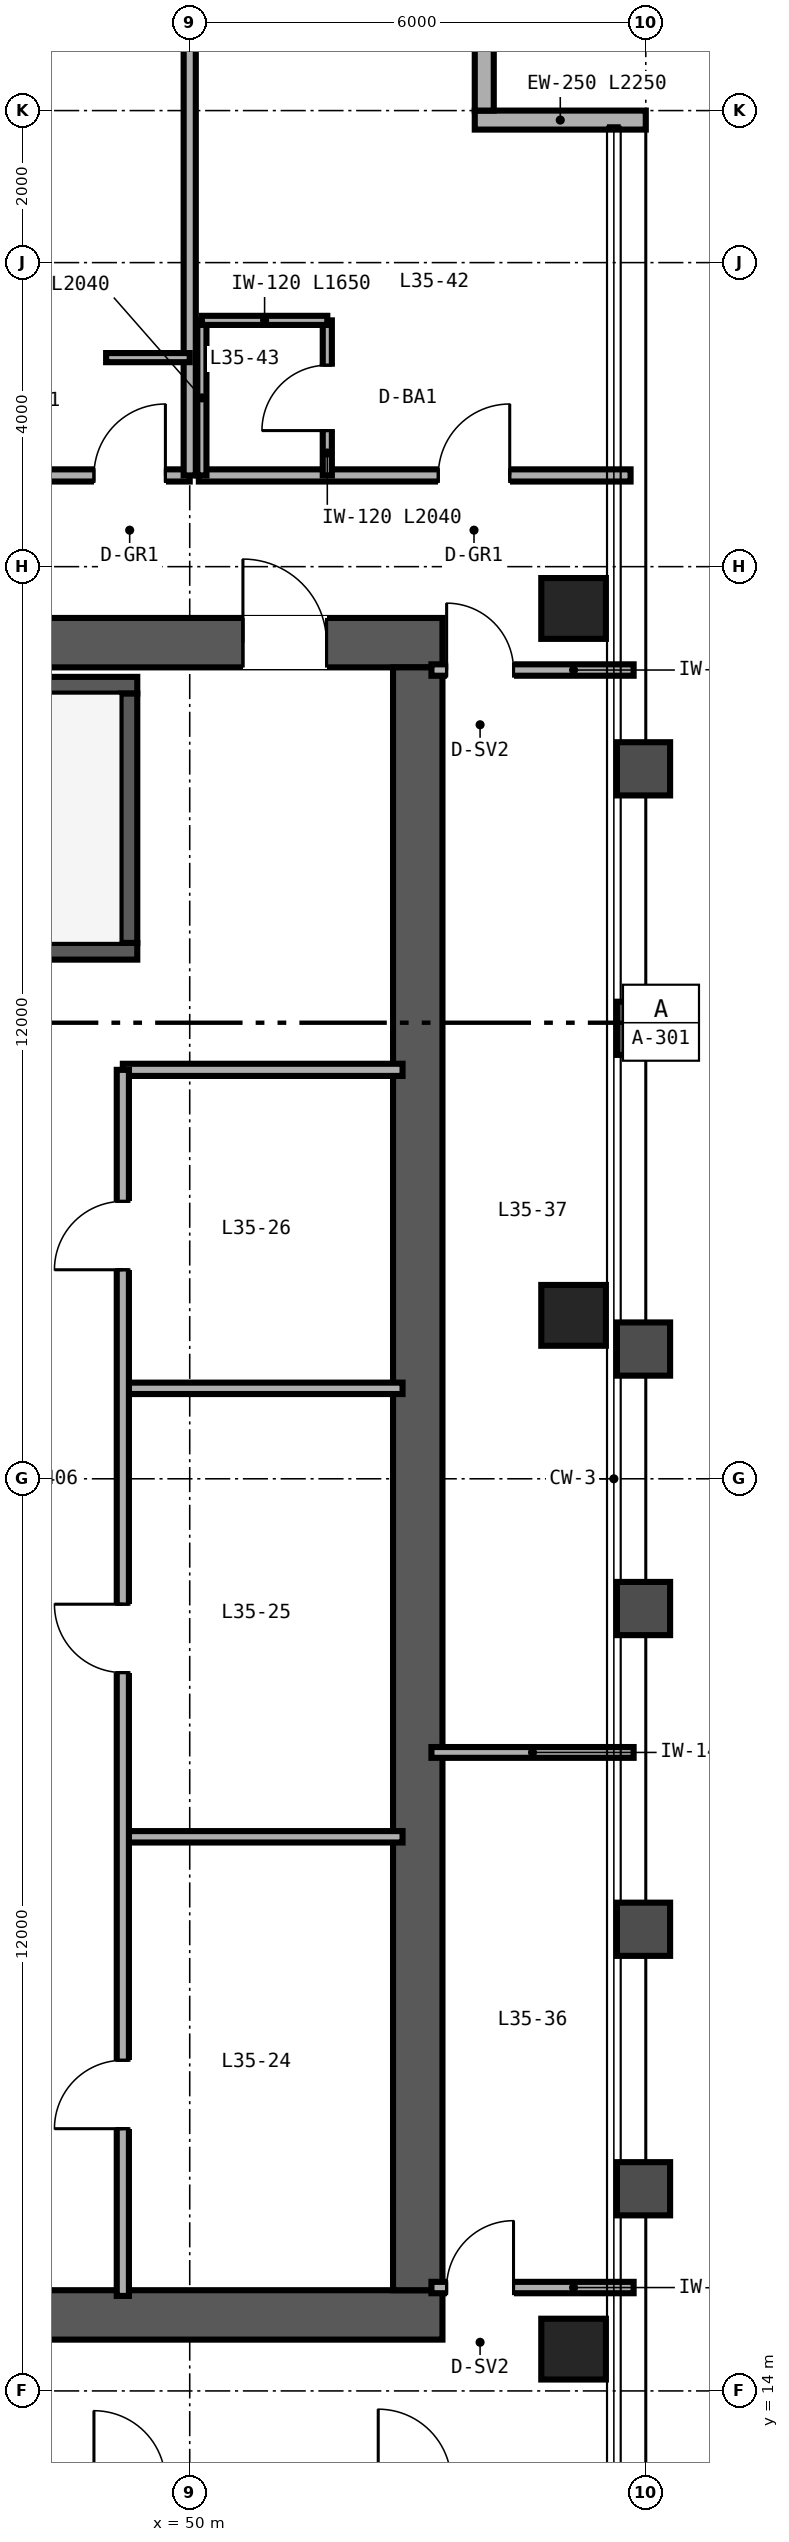
"""IFC4 building model, lengths in metres.
Left out: names, types, materials, properties, quantities, classifications, styles, units other than length and angle.
Written with IfcOpenShell. Run it as: python <this file> out.ifc"""

import sys

from ifc_helpers import new_model, si_unit, direction, frame, frame_2d, origin, origin_2d, place, context, subcontext, project, spatial, rectangle, hollow_rectangle, extrude, source, transform, mapped, element, fill, save


model = new_model("IFC4")
c1 = context("Model", 3, precision=1e-05, world=origin(), true_north=direction((0.0, 1.0)))
c2 = subcontext(c1, "Body", "Model", "MODEL_VIEW")
j1 = project(units=[si_unit("LENGTHUNIT", "METRE"), si_unit("PLANEANGLEUNIT", "RADIAN")], contexts=[c1])
p1 = place(None, origin())
s1 = spatial("IfcSite", under=j1, at=p1, CompositionType="ELEMENT")
p2 = place(p1, origin())
s2 = spatial("IfcBuilding", under=s1, at=p2, CompositionType="ELEMENT")
p3 = place(p2, frame((0.0, 0.0, 140.4)))
s3 = spatial("IfcBuildingStorey", under=s2, at=p3, CompositionType="ELEMENT", Elevation=140.4)
p4 = place(p3, frame((40.675, 15.0, 0.0), z_axis=(0.0, 0.0, 1.0), x_axis=(1.0, 0.0, 0.0)))
e1 = element("IfcWall", 1, at=p4, inside=s3, PredefinedType="SHEAR", context=c2, shape_type="SweptSolid", body=[
    extrude(rectangle(XDim=12.65, YDim=0.65, at=frame_2d((6.325, 0.0))), origin(), (0.0, 0.0, 1.0), 3.36),
])
p5 = place(p4, frame((4.425, 0.0, 0.0)))
e2 = element("IfcOpeningElement", 2, at=p5, cuts=e1, PredefinedType="OPENING", context=c2, shape_type="SweptSolid", body=[
    extrude(rectangle(XDim=1.0, YDim=2.15, at=frame_2d((0.5, 1.075))), frame((0.0, 0.335, 0.0), z_axis=(0.0, -1.0, 0.0), x_axis=(1.0, 0.0, 0.0)), (0.0, 0.0, 1.0), 0.67),
])
p6 = place(p3, frame((40.675, 37.0, 0.0), z_axis=(0.0, 0.0, 1.0), x_axis=(1.0, 0.0, 0.0)))
e3 = element("IfcWall", 3, at=p6, inside=s3, PredefinedType="SHEAR", context=c2, shape_type="SweptSolid", body=[
    extrude(rectangle(XDim=12.65, YDim=0.65, at=frame_2d((6.325, 0.0))), origin(), (0.0, 0.0, 1.0), 3.36),
])
p7 = place(p6, frame((10.025, 0.0, 0.0)))
e4 = element("IfcOpeningElement", 4, at=p7, cuts=e3, PredefinedType="OPENING", context=c2, shape_type="SweptSolid", body=[
    extrude(rectangle(XDim=1.1, YDim=2.15, at=frame_2d((0.55, 1.075))), frame((0.0, 0.335, 0.0), z_axis=(0.0, -1.0, 0.0), x_axis=(1.0, 0.0, 0.0)), (0.0, 0.0, 1.0), 0.67),
])
p8 = place(p3, frame((53.0, 15.325, 0.0), z_axis=(0.0, 0.0, 1.0), x_axis=(0.0, 1.0, 0.0)))
e5 = element("IfcWall", 5, at=p8, inside=s3, PredefinedType="SHEAR", context=c2, shape_type="SweptSolid", body=[
    extrude(rectangle(XDim=21.35, YDim=0.65, at=frame_2d((10.675, 0.0))), origin(), (0.0, 0.0, 1.0), 3.36),
])
p9 = place(p3, frame((41.325, 32.94, 0.0), z_axis=(0.0, 0.0, 1.0), x_axis=(1.0, 0.0, 0.0)))
e6 = element("IfcWall", 6, at=p9, inside=s3, PredefinedType="SHEAR", context=c2, shape_type="SweptSolid", body=[
    extrude(rectangle(XDim=7.985, YDim=0.22, at=frame_2d((3.993, 0.0))), origin(), (0.0, 0.0, 1.0), 3.4),
])
p10 = place(p9, frame((0.595, 0.0, 0.0)))
e7 = element("IfcOpeningElement", 7, at=p10, cuts=e6, PredefinedType="OPENING", context=c2, shape_type="SweptSolid", body=[
    extrude(rectangle(XDim=1.05, YDim=2.15, at=frame_2d((0.525, 1.075))), frame((0.0, 0.12, 0.0), z_axis=(0.0, -1.0, 0.0), x_axis=(1.0, 0.0, 0.0)), (0.0, 0.0, 1.0), 0.24),
])
p11 = place(p3, frame((41.325, 36.44, 0.0), z_axis=(0.0, 0.0, 1.0), x_axis=(1.0, 0.0, 0.0)))
e8 = element("IfcWall", 8, at=p11, inside=s3, PredefinedType="SHEAR", context=c2, shape_type="SweptSolid", body=[
    extrude(rectangle(XDim=7.985, YDim=0.22, at=frame_2d((3.993, 0.0))), origin(), (0.0, 0.0, 1.0), 3.4),
])
p12 = place(p3, frame((49.2, 33.05, 0.0), z_axis=(0.0, 0.0, 1.0), x_axis=(0.0, 1.0, 0.0)))
e9 = element("IfcWall", 9, at=p12, inside=s3, PredefinedType="SHEAR", context=c2, shape_type="SweptSolid", body=[
    extrude(rectangle(XDim=3.28, YDim=0.22, at=frame_2d((1.64, 0.0))), origin(), (0.0, 0.0, 1.0), 3.4),
])
m1 = source(origin(), c2, "Body", "SweptSolid", [
    extrude(hollow_rectangle(XDim=0.85, YDim=0.8, WallThickness=0.032, at=origin_2d()), origin(), (0.0, 0.0, 1.0), 3.36),
])
for number, where, z_axis, x_axis in (
    (10, (55.05, 14.55, 0.0), (0.0, 0.0, 1.0), (1.0, 0.0, 0.0)),
    (11, (55.05, 28.15, 0.0), (0.0, 0.0, 1.0), (1.0, 0.0, 0.0)),
    (12, (55.05, 37.45, 0.0), (0.0, 0.0, 1.0), (1.0, 0.0, 0.0)),
):
    element("IfcColumn", number, at=place(p3, frame(where, z_axis=z_axis, x_axis=x_axis)), inside=s3, PredefinedType="COLUMN", context=c2, shape_type="MappedRepresentation", body=[
        mapped(m1, transform((0.0, 0.0, 0.0), scale=1.0)),
    ])
p13 = place(p3, frame((56.0, 43.875, 0.0), z_axis=(0.0, 0.0, 1.0), x_axis=(-1.0, 0.0, 0.0)))
e13 = element("IfcWall", 13, at=p13, inside=s3, PredefinedType="SOLIDWALL", context=c2, shape_type="SweptSolid", body=[
    extrude(rectangle(XDim=2.25, YDim=0.25, at=frame_2d((1.125, 0.0))), origin(), (0.0, 0.0, 1.0), 3.36),
])
p14 = place(p3, frame((53.875, 44.0, 0.0), z_axis=(0.0, 0.0, 1.0), x_axis=(0.0, 1.0, 0.0)))
e14 = element("IfcWall", 14, at=p14, inside=s3, PredefinedType="SOLIDWALL", context=c2, shape_type="SweptSolid", body=[
    extrude(rectangle(XDim=2.0, YDim=0.25, at=frame_2d((1.0, 0.0))), origin(), (0.0, 0.0, 1.0), 3.36),
])
p15 = place(p3, frame((49.12, 31.38, 0.0), z_axis=(0.0, 0.0, 1.0), x_axis=(1.0, 0.0, 0.0)))
e15 = element("IfcWall", 15, at=p15, inside=s3, PredefinedType="PARTITIONING", context=c2, shape_type="SweptSolid", body=[
    extrude(rectangle(XDim=3.68, YDim=0.16, at=frame_2d((1.84, 0.0))), origin(), (0.0, 0.0, 1.0), 2.36),
])
for number, where, z_axis, x_axis in (
    (16, (49.12, 21.29, 0.0), (0.0, 0.0, 1.0), (1.0, 0.0, 0.0)),
    (17, (49.12, 27.19, 0.0), (0.0, 0.0, 1.0), (1.0, 0.0, 0.0)),
):
    element("IfcWall", number, at=place(p3, frame(where, z_axis=z_axis, x_axis=x_axis)), inside=s3, PredefinedType="PARTITIONING", context=c2, shape_type="SweptSolid", body=[
        extrude(rectangle(XDim=3.68, YDim=0.15, at=frame_2d((1.84, 0.0))), origin(), (0.0, 0.0, 1.0), 3.36),
    ])
p16 = place(p3, frame((49.12, 15.25, 0.0), z_axis=(0.0, 0.0, 1.0), x_axis=(0.0, 1.0, 0.0)))
e18 = element("IfcWall", 18, at=p16, inside=s3, PredefinedType="PARTITIONING", context=c2, shape_type="SweptSolid", body=[
    extrude(rectangle(XDim=16.13, YDim=0.16, at=frame_2d((8.065, 0.0))), origin(), (0.0, 0.0, 1.0), 2.36),
])
p17 = place(p16, frame((2.2, 0.0, 0.0)))
e19 = element("IfcOpeningElement", 19, at=p17, cuts=e18, PredefinedType="OPENING", context=c2, shape_type="SweptSolid", body=[
    extrude(rectangle(XDim=0.9, YDim=2.15, at=frame_2d((0.45, 1.075))), frame((0.0, 0.09, 0.0), z_axis=(0.0, -1.0, 0.0), x_axis=(1.0, 0.0, 0.0)), (0.0, 0.0, 1.0), 0.18),
])
p18 = place(p16, frame((8.2, 0.0, 0.0)))
e20 = element("IfcOpeningElement", 20, at=p18, cuts=e18, PredefinedType="OPENING", context=c2, shape_type="SweptSolid", body=[
    extrude(rectangle(XDim=0.9, YDim=2.15, at=frame_2d((0.45, 1.075))), frame((0.0, 0.09, 0.0), z_axis=(0.0, -1.0, 0.0), x_axis=(1.0, 0.0, 0.0)), (0.0, 0.0, 1.0), 0.18),
])
p19 = place(p16, frame((13.5, 0.0, 0.0)))
e21 = element("IfcOpeningElement", 21, at=p19, cuts=e18, PredefinedType="OPENING", context=c2, shape_type="SweptSolid", body=[
    extrude(rectangle(XDim=0.9, YDim=2.15, at=frame_2d((0.45, 1.075))), frame((0.0, 0.09, 0.0), z_axis=(0.0, -1.0, 0.0), x_axis=(1.0, 0.0, 0.0)), (0.0, 0.0, 1.0), 0.18),
])
p20 = place(p3, frame((53.18, 15.36, 0.0), z_axis=(0.0, 0.0, 1.0), x_axis=(1.0, 0.0, 0.0)))
e22 = element("IfcWall", 22, at=p20, inside=s3, PredefinedType="PARTITIONING", context=c2, shape_type="SweptSolid", body=[
    extrude(rectangle(XDim=2.66, YDim=0.15, at=frame_2d((1.33, 0.0))), origin(), (0.0, 0.0, 1.0), 2.581),
])
p21 = place(p20, frame((0.2, 0.0, 0.0)))
e23 = element("IfcOpeningElement", 23, at=p21, cuts=e22, PredefinedType="OPENING", context=c2, shape_type="SweptSolid", body=[
    extrude(rectangle(XDim=0.88, YDim=2.15, at=frame_2d((0.44, 1.075))), frame((0.0, 0.085, 0.0), z_axis=(0.0, -1.0, 0.0), x_axis=(1.0, 0.0, 0.0)), (0.0, 0.0, 1.0), 0.17),
])
p22 = place(p3, frame((53.18, 36.64, 0.0), z_axis=(0.0, 0.0, 1.0), x_axis=(1.0, 0.0, 0.0)))
e24 = element("IfcWall", 24, at=p22, inside=s3, PredefinedType="PARTITIONING", context=c2, shape_type="SweptSolid", body=[
    extrude(rectangle(XDim=2.66, YDim=0.15, at=frame_2d((1.33, 0.0))), origin(), (0.0, 0.0, 1.0), 2.743),
])
p23 = place(p22, frame((0.2, 0.0, 0.0)))
e25 = element("IfcOpeningElement", 25, at=p23, cuts=e24, PredefinedType="OPENING", context=c2, shape_type="SweptSolid", body=[
    extrude(rectangle(XDim=0.88, YDim=2.15, at=frame_2d((0.44, 1.075))), frame((0.0, 0.085, 0.0), z_axis=(0.0, -1.0, 0.0), x_axis=(1.0, 0.0, 0.0)), (0.0, 0.0, 1.0), 0.17),
])
p24 = place(p3, frame((53.18, 22.4, 0.0), z_axis=(0.0, 0.0, 1.0), x_axis=(1.0, 0.0, 0.0)))
e26 = element("IfcWall", 26, at=p24, inside=s3, PredefinedType="PARTITIONING", context=c2, shape_type="SweptSolid", body=[
    extrude(rectangle(XDim=2.66, YDim=0.142, at=frame_2d((1.33, 0.0))), origin(), (0.0, 0.0, 1.0), 2.581),
])
p25 = place(p3, frame((50.12, 39.2, 0.0), z_axis=(0.0, 0.0, 1.0), x_axis=(1.0, 0.0, 0.0)))
e27 = element("IfcWall", 27, at=p25, inside=s3, PredefinedType="PARTITIONING", context=c2, shape_type="SweptSolid", body=[
    extrude(rectangle(XDim=5.68, YDim=0.16, at=frame_2d((2.84, 0.0))), origin(), (0.0, 0.0, 1.0), 3.36),
])
p26 = place(p25, frame((3.15, 0.0, 0.0)))
e28 = element("IfcOpeningElement", 28, at=p26, cuts=e27, PredefinedType="OPENING", context=c2, shape_type="SweptSolid", body=[
    extrude(rectangle(XDim=0.94, YDim=2.15, at=frame_2d((0.47, 1.075))), frame((0.0, 0.09, 0.0), z_axis=(0.0, -1.0, 0.0), x_axis=(1.0, 0.0, 0.0)), (0.0, 0.0, 1.0), 0.18),
])
p27 = place(p3, frame((51.81, 39.2, 0.0), z_axis=(0.0, 0.0, 1.0), x_axis=(0.0, 1.0, 0.0)))
e29 = element("IfcWall", 29, at=p27, inside=s3, PredefinedType="PARTITIONING", context=c2, shape_type="SweptSolid", body=[
    extrude(rectangle(XDim=2.04, YDim=0.12, at=frame_2d((1.02, 0.0))), origin(), (0.0, 0.0, 1.0), 3.36),
])
p28 = place(p27, frame((0.59, 0.0, 0.0)))
e30 = element("IfcOpeningElement", 30, at=p28, cuts=e29, PredefinedType="OPENING", context=c2, shape_type="SweptSolid", body=[
    extrude(rectangle(XDim=0.86, YDim=2.1, at=frame_2d((0.43, 1.05))), frame((0.0, 0.07, 0.0), z_axis=(0.0, -1.0, 0.0), x_axis=(1.0, 0.0, 0.0)), (0.0, 0.0, 1.0), 0.14),
])
p29 = place(p3, frame((50.16, 39.2, 0.0), z_axis=(0.0, 0.0, 1.0), x_axis=(0.0, 1.0, 0.0)))
e31 = element("IfcWall", 31, at=p29, inside=s3, PredefinedType="PARTITIONING", context=c2, shape_type="SweptSolid", body=[
    extrude(rectangle(XDim=2.04, YDim=0.12, at=frame_2d((1.02, 0.0))), origin(), (0.0, 0.0, 1.0), 3.36),
])
p30 = place(p3, frame((50.16, 41.24, 0.0), z_axis=(0.0, 0.0, 1.0), x_axis=(1.0, 0.0, 0.0)))
e32 = element("IfcWall", 32, at=p30, inside=s3, PredefinedType="PARTITIONING", context=c2, shape_type="SweptSolid", body=[
    extrude(rectangle(XDim=1.65, YDim=0.12, at=frame_2d((0.825, 0.0))), origin(), (0.0, 0.0, 1.0), 3.36),
])
p31 = place(p3, frame((14.0, 39.2, 0.0), z_axis=(0.0, 0.0, 1.0), x_axis=(1.0, 0.0, 0.0)))
e33 = element("IfcWall", 33, at=p31, inside=s3, PredefinedType="PARTITIONING", context=c2, shape_type="SweptSolid", body=[
    extrude(rectangle(XDim=36.0, YDim=0.16, at=frame_2d((18.0, 0.0))), origin(), (0.0, 0.0, 1.0), 2.581),
])
p32 = place(p31, frame((4.34, 0.0, 0.0)))
e34 = element("IfcOpeningElement", 34, at=p32, cuts=e33, PredefinedType="OPENING", context=c2, shape_type="SweptSolid", body=[
    extrude(rectangle(XDim=0.94, YDim=2.15, at=frame_2d((0.47, 1.075))), frame((0.0, 0.09, 0.0), z_axis=(0.0, -1.0, 0.0), x_axis=(1.0, 0.0, 0.0)), (0.0, 0.0, 1.0), 0.18),
])
p33 = place(p31, frame((9.94, 0.0, 0.0)))
e35 = element("IfcOpeningElement", 35, at=p33, cuts=e33, PredefinedType="OPENING", context=c2, shape_type="SweptSolid", body=[
    extrude(rectangle(XDim=0.94, YDim=2.15, at=frame_2d((0.47, 1.075))), frame((0.0, 0.09, 0.0), z_axis=(0.0, -1.0, 0.0), x_axis=(1.0, 0.0, 0.0)), (0.0, 0.0, 1.0), 0.18),
])
p34 = place(p31, frame((17.3, 0.0, 0.0)))
e36 = element("IfcOpeningElement", 36, at=p34, cuts=e33, PredefinedType="OPENING", context=c2, shape_type="SweptSolid", body=[
    extrude(rectangle(XDim=0.98, YDim=2.2, at=frame_2d((0.49, 1.1))), frame((0.0, 0.09, 0.0), z_axis=(0.0, -1.0, 0.0), x_axis=(1.0, 0.0, 0.0)), (0.0, 0.0, 1.0), 0.18),
])
p35 = place(p31, frame((24.7, 0.0, 0.0)))
e37 = element("IfcOpeningElement", 37, at=p35, cuts=e33, PredefinedType="OPENING", context=c2, shape_type="SweptSolid", body=[
    extrude(rectangle(XDim=0.98, YDim=2.2, at=frame_2d((0.49, 1.1))), frame((0.0, 0.09, 0.0), z_axis=(0.0, -1.0, 0.0), x_axis=(1.0, 0.0, 0.0)), (0.0, 0.0, 1.0), 0.18),
])
p36 = place(p31, frame((28.12, 0.0, 0.0)))
e38 = element("IfcOpeningElement", 38, at=p36, cuts=e33, PredefinedType="OPENING", context=c2, shape_type="SweptSolid", body=[
    extrude(rectangle(XDim=0.96, YDim=2.15, at=frame_2d((0.48, 1.075))), frame((0.0, 0.09, 0.0), z_axis=(0.0, -1.0, 0.0), x_axis=(1.0, 0.0, 0.0)), (0.0, 0.0, 1.0), 0.18),
])
p37 = place(p31, frame((34.74, 0.0, 0.0)))
e39 = element("IfcOpeningElement", 39, at=p37, cuts=e33, PredefinedType="OPENING", context=c2, shape_type="SweptSolid", body=[
    extrude(rectangle(XDim=0.94, YDim=2.15, at=frame_2d((0.47, 1.075))), frame((0.0, 0.09, 0.0), z_axis=(0.0, -1.0, 0.0), x_axis=(1.0, 0.0, 0.0)), (0.0, 0.0, 1.0), 0.18),
])
p38 = place(p3, frame((50.0, 39.2, 0.0), z_axis=(0.0, 0.0, 1.0), x_axis=(0.0, 1.0, 0.0)))
e40 = element("IfcWall", 40, at=p38, inside=s3, PredefinedType="PARTITIONING", context=c2, shape_type="SweptSolid", body=[
    extrude(rectangle(XDim=10.44, YDim=0.16, at=frame_2d((5.22, 0.0))), origin(), (0.0, 0.0, 1.0), 2.667),
])
p39 = place(p3, frame((48.9, 40.75, 0.0), z_axis=(0.0, 0.0, 1.0), x_axis=(1.0, 0.0, 0.0)))
e41 = element("IfcWall", 41, at=p39, inside=s3, PredefinedType="PARTITIONING", context=c2, shape_type="SweptSolid", body=[
    extrude(rectangle(XDim=1.1, YDim=0.12, at=frame_2d((0.55, 0.0))), origin(), (0.0, 0.0, 1.0), 3.36),
])
m2 = source(origin(), c2, "Body", "SweptSolid", [
    extrude(rectangle(XDim=1.1, YDim=2.15, at=frame_2d((0.55, 1.075))), frame((0.0, 0.025, 0.0), z_axis=(0.0, -1.0, 0.0), x_axis=(1.0, 0.0, 0.0)), (0.0, 0.0, 1.0), 0.05),
])
p40 = place(p7, origin())
e42 = element("IfcDoor", 42, at=p40, inside=s3, OperationType="SINGLE_SWING_LEFT", PredefinedType="DOOR", context=c2, shape_type="MappedRepresentation", body=[
    mapped(m2, transform((0.0, 0.0, 0.0), scale=1.0)),
])
fill(e4, e42)
m3 = source(origin(), c2, "Body", "SweptSolid", [
    extrude(rectangle(XDim=0.9, YDim=2.15, at=frame_2d((0.45, 1.075))), frame((0.0, 0.025, 0.0), z_axis=(0.0, -1.0, 0.0), x_axis=(1.0, 0.0, 0.0)), (0.0, 0.0, 1.0), 0.05),
])
p41 = place(p17, origin())
e43 = element("IfcDoor", 43, at=p41, inside=s3, OperationType="SINGLE_SWING_LEFT", PredefinedType="DOOR", context=c2, shape_type="MappedRepresentation", body=[
    mapped(m3, transform((0.0, 0.0, 0.0), scale=1.0)),
])
fill(e19, e43)
p42 = place(p18, origin())
e44 = element("IfcDoor", 44, at=p42, inside=s3, OperationType="SINGLE_SWING_RIGHT", PredefinedType="DOOR", context=c2, shape_type="MappedRepresentation", body=[
    mapped(m3, transform((0.0, 0.0, 0.0), scale=1.0)),
])
fill(e20, e44)
p43 = place(p19, origin())
e45 = element("IfcDoor", 45, at=p43, inside=s3, OperationType="SINGLE_SWING_LEFT", PredefinedType="DOOR", context=c2, shape_type="MappedRepresentation", body=[
    mapped(m3, transform((0.0, 0.0, 0.0), scale=1.0)),
])
fill(e21, e45)
m4 = source(origin(), c2, "Body", "SweptSolid", [
    extrude(rectangle(XDim=0.88, YDim=2.15, at=frame_2d((0.44, 1.075))), frame((0.0, 0.025, 0.0), z_axis=(0.0, -1.0, 0.0), x_axis=(1.0, 0.0, 0.0)), (0.0, 0.0, 1.0), 0.05),
])
p44 = place(p21, origin())
e46 = element("IfcDoor", 46, at=p44, inside=s3, OperationType="SINGLE_SWING_RIGHT", PredefinedType="DOOR", context=c2, shape_type="MappedRepresentation", body=[
    mapped(m4, transform((0.0, 0.0, 0.0), scale=1.0)),
])
fill(e23, e46)
p45 = place(p23, origin())
e47 = element("IfcDoor", 47, at=p45, inside=s3, OperationType="SINGLE_SWING_LEFT", PredefinedType="DOOR", context=c2, shape_type="MappedRepresentation", body=[
    mapped(m4, transform((0.0, 0.0, 0.0), scale=1.0)),
])
fill(e25, e47)
m5 = source(origin(), c2, "Body", "SweptSolid", [
    extrude(rectangle(XDim=0.86, YDim=2.1, at=frame_2d((0.43, 1.05))), frame((0.0, 0.025, 0.0), z_axis=(0.0, -1.0, 0.0), x_axis=(1.0, 0.0, 0.0)), (0.0, 0.0, 1.0), 0.05),
])
p46 = place(p28, origin())
e48 = element("IfcDoor", 48, at=p46, inside=s3, OperationType="SINGLE_SWING_LEFT", PredefinedType="DOOR", context=c2, shape_type="MappedRepresentation", body=[
    mapped(m5, transform((0.0, 0.0, 0.0), scale=1.0)),
])
fill(e30, e48)
m6 = source(origin(), c2, "Body", "SweptSolid", [
    extrude(rectangle(XDim=0.94, YDim=2.15, at=frame_2d((0.47, 1.075))), frame((0.0, 0.025, 0.0), z_axis=(0.0, -1.0, 0.0), x_axis=(1.0, 0.0, 0.0)), (0.0, 0.0, 1.0), 0.05),
])
p47 = place(p26, origin())
e49 = element("IfcDoor", 49, at=p47, inside=s3, OperationType="SINGLE_SWING_RIGHT", PredefinedType="DOOR", context=c2, shape_type="MappedRepresentation", body=[
    mapped(m6, transform((0.0, 0.0, 0.0), scale=1.0)),
])
fill(e28, e49)
p48 = place(p37, origin())
e50 = element("IfcDoor", 50, at=p48, inside=s3, OperationType="SINGLE_SWING_RIGHT", PredefinedType="DOOR", context=c2, shape_type="MappedRepresentation", body=[
    mapped(m6, transform((0.0, 0.0, 0.0), scale=1.0)),
])
fill(e39, e50)
save(model, sys.argv[1])
